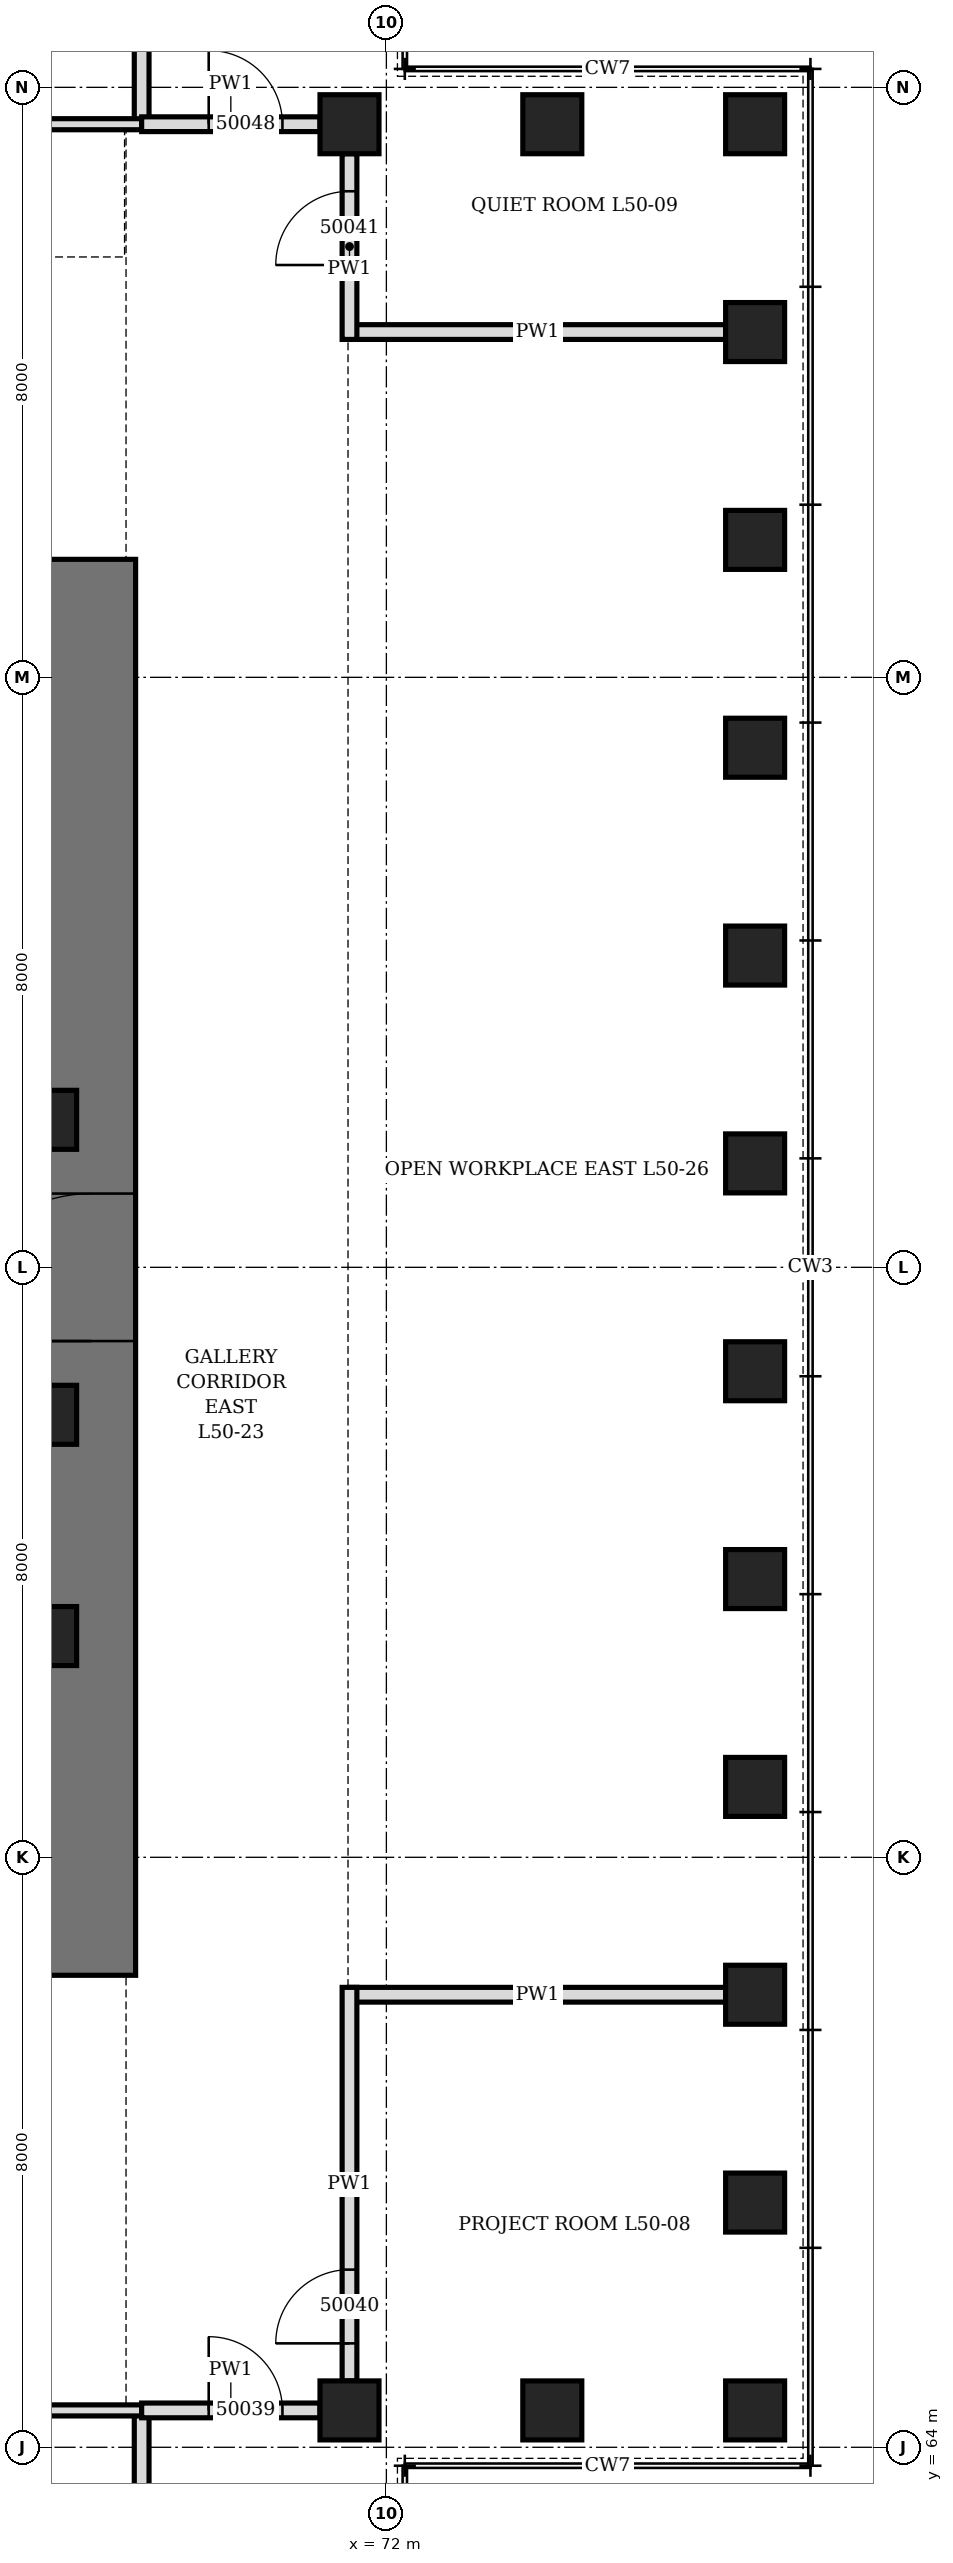
"""IFC4 building model, lengths in metres.
Left out: names, types, materials, properties, quantities, classifications, styles, units other than length and angle.
Written with IfcOpenShell. Run it as: python <this file> out.ifc"""

import sys

from ifc_helpers import new_model, si_unit, direction, frame, frame_2d, origin, origin_2d, place, context, subcontext, project, spatial, rectangle, hollow_rectangle, extrude, element, fill, save


model = new_model("IFC4")
c1 = context("Model", 3, precision=1e-05, world=origin(), true_north=direction((0.0, 1.0)))
c2 = subcontext(c1, "Body", "Model", "MODEL_VIEW")
j1 = project(units=[si_unit("LENGTHUNIT", "METRE"), si_unit("PLANEANGLEUNIT", "RADIAN")], contexts=[c1])
p1 = place(None, origin())
s1 = spatial("IfcSite", under=j1, at=p1, CompositionType="ELEMENT")
p2 = place(p1, origin())
s2 = spatial("IfcBuilding", under=s1, at=p2, CompositionType="ELEMENT")
p3 = place(p2, frame((0.0, 0.0, 223.3)))
s3 = spatial("IfcBuildingStorey", under=s2, at=p3, CompositionType="ELEMENT", Elevation=223.3)
for number, where, z_axis, x_axis in (
    (1, (71.5, 64.5, 0.0), (0.0, 0.0, 1.0), (1.0, 0.0, 0.0)),
    (2, (74.25, 64.5, 0.0), (0.0, 0.0, 1.0), (1.0, 0.0, 0.0)),
    (3, (77.0, 64.5, 0.0), (0.0, 0.0, 1.0), (0.0, 1.0, 0.0)),
    (4, (77.0, 67.318, 0.0), (0.0, 0.0, 1.0), (0.0, 1.0, 0.0)),
    (5, (77.0, 70.136, 0.0), (0.0, 0.0, 1.0), (0.0, 1.0, 0.0)),
    (6, (77.0, 72.955, 0.0), (0.0, 0.0, 1.0), (0.0, 1.0, 0.0)),
    (7, (77.0, 75.773, 0.0), (0.0, 0.0, 1.0), (0.0, 1.0, 0.0)),
    (8, (77.0, 78.591, 0.0), (0.0, 0.0, 1.0), (0.0, 1.0, 0.0)),
    (9, (77.0, 81.409, 0.0), (0.0, 0.0, 1.0), (0.0, 1.0, 0.0)),
    (10, (77.0, 84.227, 0.0), (0.0, 0.0, 1.0), (0.0, 1.0, 0.0)),
    (11, (77.0, 87.045, 0.0), (0.0, 0.0, 1.0), (0.0, 1.0, 0.0)),
    (12, (77.0, 89.864, 0.0), (0.0, 0.0, 1.0), (0.0, 1.0, 0.0)),
    (13, (77.0, 92.682, 0.0), (0.0, 0.0, 1.0), (0.0, 1.0, 0.0)),
    (14, (77.0, 95.5, 0.0), (0.0, 0.0, 1.0), (1.0, 0.0, 0.0)),
    (15, (74.25, 95.5, 0.0), (0.0, 0.0, 1.0), (1.0, 0.0, 0.0)),
    (16, (71.5, 95.5, 0.0), (0.0, 0.0, 1.0), (0.0, 1.0, 0.0)),
):
    element("IfcColumn", number, at=place(p3, frame(where, z_axis=z_axis, x_axis=x_axis)), inside=s3, PredefinedType="COLUMN", context=c2, shape_type="SweptSolid", body=[
        extrude(hollow_rectangle(XDim=0.8, YDim=0.8, WallThickness=0.08, at=origin_2d()), origin(), (0.0, 0.0, 1.0), 4.2),
    ])
p4 = place(p3, frame((68.0, 70.4, 0.0), z_axis=(0.0, 0.0, 1.0), x_axis=(0.0, 1.0, 0.0)))
e17 = element("IfcWall", 17, at=p4, inside=s3, PredefinedType="SHEAR", context=c2, shape_type="SweptSolid", body=[
    extrude(rectangle(XDim=19.2, YDim=1.2, at=frame_2d((9.6, 0.0))), origin(), (0.0, 0.0, 1.0), 4.2),
])
p5 = place(p4, frame((8.6, 0.0, 0.0)))
e18 = element("IfcOpeningElement", 18, at=p5, cuts=e17, PredefinedType="OPENING", context=c2, shape_type="SweptSolid", body=[
    extrude(rectangle(XDim=2.0, YDim=2.4, at=frame_2d((1.0, 1.2))), frame((0.0, 0.61, 0.0), z_axis=(0.0, -1.0, 0.0), x_axis=(1.0, 0.0, 0.0)), (0.0, 0.0, 1.0), 1.22),
])
for number, where, z_axis, x_axis in (
    (19, (67.4, 75.0, 0.0), (0.0, 0.0, 1.0), (1.0, 0.0, 0.0)),
    (20, (67.4, 78.0, 0.0), (0.0, 0.0, 1.0), (1.0, 0.0, 0.0)),
    (21, (67.4, 82.0, 0.0), (0.0, 0.0, 1.0), (1.0, 0.0, 0.0)),
):
    element("IfcColumn", number, at=place(p3, frame(where, z_axis=z_axis, x_axis=x_axis)), inside=s3, PredefinedType="COLUMN", context=c2, shape_type="SweptSolid", body=[
        extrude(hollow_rectangle(XDim=0.8, YDim=0.8, WallThickness=0.1, at=origin_2d()), origin(), (0.0, 0.0, 1.0), 4.2),
    ])
for number, where, z_axis, x_axis in (
    (22, (68.682, 59.4, 0.0), (0.0, 0.0, 1.0), (0.0, 1.0, 0.0)),
    (23, (71.5, 70.136, 0.0), (0.0, 0.0, 1.0), (1.0, 0.0, 0.0)),
    (24, (71.5, 92.682, 0.0), (0.0, 0.0, 1.0), (1.0, 0.0, 0.0)),
    (25, (68.682, 95.5, 0.0), (0.0, 0.0, 1.0), (0.0, 1.0, 0.0)),
):
    element("IfcWall", number, at=place(p3, frame(where, z_axis=z_axis, x_axis=x_axis)), inside=s3, PredefinedType="PARTITIONING", context=c2, shape_type="SweptSolid", body=[
        extrude(rectangle(XDim=5.1, YDim=0.2, at=frame_2d((2.55, 0.0))), origin(), (0.0, 0.0, 1.0), 3.428),
    ])
p6 = place(p3, frame((46.136, 64.5, 0.0), z_axis=(0.0, 0.0, 1.0), x_axis=(1.0, 0.0, 0.0)))
e26 = element("IfcWall", 26, at=p6, inside=s3, PredefinedType="PARTITIONING", context=c2, shape_type="SweptSolid", body=[
    extrude(rectangle(XDim=22.545, YDim=0.15, at=frame_2d((11.273, 0.0))), origin(), (0.0, 0.0, 1.0), 4.04),
])
p7 = place(p6, frame((0.909, 0.0, 0.0)))
e27 = element("IfcOpeningElement", 27, at=p7, cuts=e26, PredefinedType="OPENING", context=c2, shape_type="SweptSolid", body=[
    extrude(rectangle(XDim=1.0, YDim=2.1, at=frame_2d((0.5, 1.05))), frame((0.0, 0.085, 0.0), z_axis=(0.0, -1.0, 0.0), x_axis=(1.0, 0.0, 0.0)), (0.0, 0.0, 1.0), 0.17),
])
p8 = place(p6, frame((6.545, 0.0, 0.0)))
e28 = element("IfcOpeningElement", 28, at=p8, cuts=e26, PredefinedType="OPENING", context=c2, shape_type="SweptSolid", body=[
    extrude(rectangle(XDim=1.0, YDim=2.1, at=frame_2d((0.5, 1.05))), frame((0.0, 0.085, 0.0), z_axis=(0.0, -1.0, 0.0), x_axis=(1.0, 0.0, 0.0)), (0.0, 0.0, 1.0), 0.17),
])
p9 = place(p6, frame((12.182, 0.0, 0.0)))
e29 = element("IfcOpeningElement", 29, at=p9, cuts=e26, PredefinedType="OPENING", context=c2, shape_type="SweptSolid", body=[
    extrude(rectangle(XDim=1.0, YDim=2.1, at=frame_2d((0.5, 1.05))), frame((0.0, 0.085, 0.0), z_axis=(0.0, -1.0, 0.0), x_axis=(1.0, 0.0, 0.0)), (0.0, 0.0, 1.0), 0.17),
])
p10 = place(p6, frame((17.818, 0.0, 0.0)))
e30 = element("IfcOpeningElement", 30, at=p10, cuts=e26, PredefinedType="OPENING", context=c2, shape_type="SweptSolid", body=[
    extrude(rectangle(XDim=1.0, YDim=2.1, at=frame_2d((0.5, 1.05))), frame((0.0, 0.085, 0.0), z_axis=(0.0, -1.0, 0.0), x_axis=(1.0, 0.0, 0.0)), (0.0, 0.0, 1.0), 0.17),
])
p11 = place(p3, frame((68.682, 64.5, 0.0), z_axis=(0.0, 0.0, 1.0), x_axis=(1.0, 0.0, 0.0)))
e31 = element("IfcWall", 31, at=p11, inside=s3, PredefinedType="PARTITIONING", context=c2, shape_type="SweptSolid", body=[
    extrude(rectangle(XDim=2.418, YDim=0.2, at=frame_2d((1.209, 0.0))), origin(), (0.0, 0.0, 1.0), 4.04),
])
p12 = place(p11, frame((0.909, 0.0, 0.0)))
e32 = element("IfcOpeningElement", 32, at=p12, cuts=e31, PredefinedType="OPENING", context=c2, shape_type="SweptSolid", body=[
    extrude(rectangle(XDim=1.0, YDim=2.1, at=frame_2d((0.5, 1.05))), frame((0.0, 0.11, 0.0), z_axis=(0.0, -1.0, 0.0), x_axis=(1.0, 0.0, 0.0)), (0.0, 0.0, 1.0), 0.22),
])
p13 = place(p3, frame((43.318, 95.5, 0.0), z_axis=(0.0, 0.0, 1.0), x_axis=(1.0, 0.0, 0.0)))
e33 = element("IfcWall", 33, at=p13, inside=s3, PredefinedType="PARTITIONING", context=c2, shape_type="SweptSolid", body=[
    extrude(rectangle(XDim=25.364, YDim=0.15, at=frame_2d((12.682, 0.0))), origin(), (0.0, 0.0, 1.0), 4.04),
])
p14 = place(p13, frame((0.909, 0.0, 0.0)))
e34 = element("IfcOpeningElement", 34, at=p14, cuts=e33, PredefinedType="OPENING", context=c2, shape_type="SweptSolid", body=[
    extrude(rectangle(XDim=1.0, YDim=2.4, at=frame_2d((0.5, 1.2))), frame((0.0, 0.085, 0.0), z_axis=(0.0, -1.0, 0.0), x_axis=(1.0, 0.0, 0.0)), (0.0, 0.0, 1.0), 0.17),
])
p15 = place(p13, frame((3.727, 0.0, 0.0)))
e35 = element("IfcOpeningElement", 35, at=p15, cuts=e33, PredefinedType="OPENING", context=c2, shape_type="SweptSolid", body=[
    extrude(rectangle(XDim=1.0, YDim=2.1, at=frame_2d((0.5, 1.05))), frame((0.0, 0.085, 0.0), z_axis=(0.0, -1.0, 0.0), x_axis=(1.0, 0.0, 0.0)), (0.0, 0.0, 1.0), 0.17),
])
p16 = place(p13, frame((9.364, 0.0, 0.0)))
e36 = element("IfcOpeningElement", 36, at=p16, cuts=e33, PredefinedType="OPENING", context=c2, shape_type="SweptSolid", body=[
    extrude(rectangle(XDim=1.0, YDim=2.1, at=frame_2d((0.5, 1.05))), frame((0.0, 0.085, 0.0), z_axis=(0.0, -1.0, 0.0), x_axis=(1.0, 0.0, 0.0)), (0.0, 0.0, 1.0), 0.17),
])
p17 = place(p13, frame((15.0, 0.0, 0.0)))
e37 = element("IfcOpeningElement", 37, at=p17, cuts=e33, PredefinedType="OPENING", context=c2, shape_type="SweptSolid", body=[
    extrude(rectangle(XDim=1.0, YDim=2.1, at=frame_2d((0.5, 1.05))), frame((0.0, 0.085, 0.0), z_axis=(0.0, -1.0, 0.0), x_axis=(1.0, 0.0, 0.0)), (0.0, 0.0, 1.0), 0.17),
])
p18 = place(p13, frame((20.636, 0.0, 0.0)))
e38 = element("IfcOpeningElement", 38, at=p18, cuts=e33, PredefinedType="OPENING", context=c2, shape_type="SweptSolid", body=[
    extrude(rectangle(XDim=1.0, YDim=2.1, at=frame_2d((0.5, 1.05))), frame((0.0, 0.085, 0.0), z_axis=(0.0, -1.0, 0.0), x_axis=(1.0, 0.0, 0.0)), (0.0, 0.0, 1.0), 0.17),
])
p19 = place(p3, frame((68.682, 95.5, 0.0), z_axis=(0.0, 0.0, 1.0), x_axis=(1.0, 0.0, 0.0)))
e39 = element("IfcWall", 39, at=p19, inside=s3, PredefinedType="PARTITIONING", context=c2, shape_type="SweptSolid", body=[
    extrude(rectangle(XDim=2.418, YDim=0.2, at=frame_2d((1.209, 0.0))), origin(), (0.0, 0.0, 1.0), 4.04),
])
p20 = place(p19, frame((0.909, 0.0, 0.0)))
e40 = element("IfcOpeningElement", 40, at=p20, cuts=e39, PredefinedType="OPENING", context=c2, shape_type="SweptSolid", body=[
    extrude(rectangle(XDim=1.0, YDim=2.1, at=frame_2d((0.5, 1.05))), frame((0.0, 0.11, 0.0), z_axis=(0.0, -1.0, 0.0), x_axis=(1.0, 0.0, 0.0)), (0.0, 0.0, 1.0), 0.22),
])
p21 = place(p3, frame((71.5, 64.9, 0.0), z_axis=(0.0, 0.0, 1.0), x_axis=(0.0, 1.0, 0.0)))
e41 = element("IfcWall", 41, at=p21, inside=s3, PredefinedType="PARTITIONING", context=c2, shape_type="SweptSolid", body=[
    extrude(rectangle(XDim=5.336, YDim=0.2, at=frame_2d((2.668, 0.0))), origin(), (0.0, 0.0, 1.0), 4.04),
])
p22 = place(p21, frame((0.509, 0.0, 0.0)))
e42 = element("IfcOpeningElement", 42, at=p22, cuts=e41, PredefinedType="OPENING", context=c2, shape_type="SweptSolid", body=[
    extrude(rectangle(XDim=1.0, YDim=2.1, at=frame_2d((0.5, 1.05))), frame((0.0, 0.11, 0.0), z_axis=(0.0, -1.0, 0.0), x_axis=(1.0, 0.0, 0.0)), (0.0, 0.0, 1.0), 0.22),
])
p23 = place(p3, frame((71.5, 92.582, 0.0), z_axis=(0.0, 0.0, 1.0), x_axis=(0.0, 1.0, 0.0)))
e43 = element("IfcWall", 43, at=p23, inside=s3, PredefinedType="PARTITIONING", context=c2, shape_type="SweptSolid", body=[
    extrude(rectangle(XDim=2.518, YDim=0.2, at=frame_2d((1.259, 0.0))), origin(), (0.0, 0.0, 1.0), 4.04),
])
p24 = place(p23, frame((1.009, 0.0, 0.0)))
e44 = element("IfcOpeningElement", 44, at=p24, cuts=e43, PredefinedType="OPENING", context=c2, shape_type="SweptSolid", body=[
    extrude(rectangle(XDim=1.0, YDim=2.1, at=frame_2d((0.5, 1.05))), frame((0.0, 0.11, 0.0), z_axis=(0.0, -1.0, 0.0), x_axis=(1.0, 0.0, 0.0)), (0.0, 0.0, 1.0), 0.22),
])
p25 = place(p5, origin())
e45 = element("IfcDoor", 45, at=p25, inside=s3, OperationType="DOUBLE_DOOR_SINGLE_SWING", PredefinedType="DOOR", context=c2, shape_type="SweptSolid", body=[
    extrude(rectangle(XDim=2.0, YDim=2.4, at=frame_2d((1.0, 1.2))), frame((0.0, 0.35, 0.0), z_axis=(0.0, -1.0, 0.0), x_axis=(1.0, 0.0, 0.0)), (0.0, 0.0, 1.0), 0.7),
])
fill(e18, e45)
p26 = place(p12, origin())
e46 = element("IfcDoor", 46, at=p26, inside=s3, OperationType="SINGLE_SWING_LEFT", PredefinedType="DOOR", context=c2, shape_type="SweptSolid", body=[
    extrude(rectangle(XDim=1.0, YDim=2.1, at=frame_2d((0.5, 1.05))), frame((0.0, 0.1, 0.0), z_axis=(0.0, -1.0, 0.0), x_axis=(1.0, 0.0, 0.0)), (0.0, 0.0, 1.0), 0.199),
])
fill(e32, e46)
p27 = place(p22, origin())
e47 = element("IfcDoor", 47, at=p27, inside=s3, OperationType="SINGLE_SWING_LEFT", PredefinedType="DOOR", context=c2, shape_type="SweptSolid", body=[
    extrude(rectangle(XDim=1.0, YDim=2.1, at=frame_2d((0.5, 1.05))), frame((0.0, 0.1, 0.0), z_axis=(0.0, -1.0, 0.0), x_axis=(1.0, 0.0, 0.0)), (0.0, 0.0, 1.0), 0.199),
])
fill(e42, e47)
p28 = place(p24, origin())
e48 = element("IfcDoor", 48, at=p28, inside=s3, OperationType="SINGLE_SWING_LEFT", PredefinedType="DOOR", context=c2, shape_type="SweptSolid", body=[
    extrude(rectangle(XDim=1.0, YDim=2.1, at=frame_2d((0.5, 1.05))), frame((0.0, 0.1, 0.0), z_axis=(0.0, -1.0, 0.0), x_axis=(1.0, 0.0, 0.0)), (0.0, 0.0, 1.0), 0.199),
])
fill(e44, e48)
p29 = place(p20, origin())
e49 = element("IfcDoor", 49, at=p29, inside=s3, OperationType="SINGLE_SWING_LEFT", PredefinedType="DOOR", context=c2, shape_type="SweptSolid", body=[
    extrude(rectangle(XDim=1.0, YDim=2.1, at=frame_2d((0.5, 1.05))), frame((0.0, 0.1, 0.0), z_axis=(0.0, -1.0, 0.0), x_axis=(1.0, 0.0, 0.0)), (0.0, 0.0, 1.0), 0.199),
])
fill(e40, e49)
save(model, sys.argv[1])
